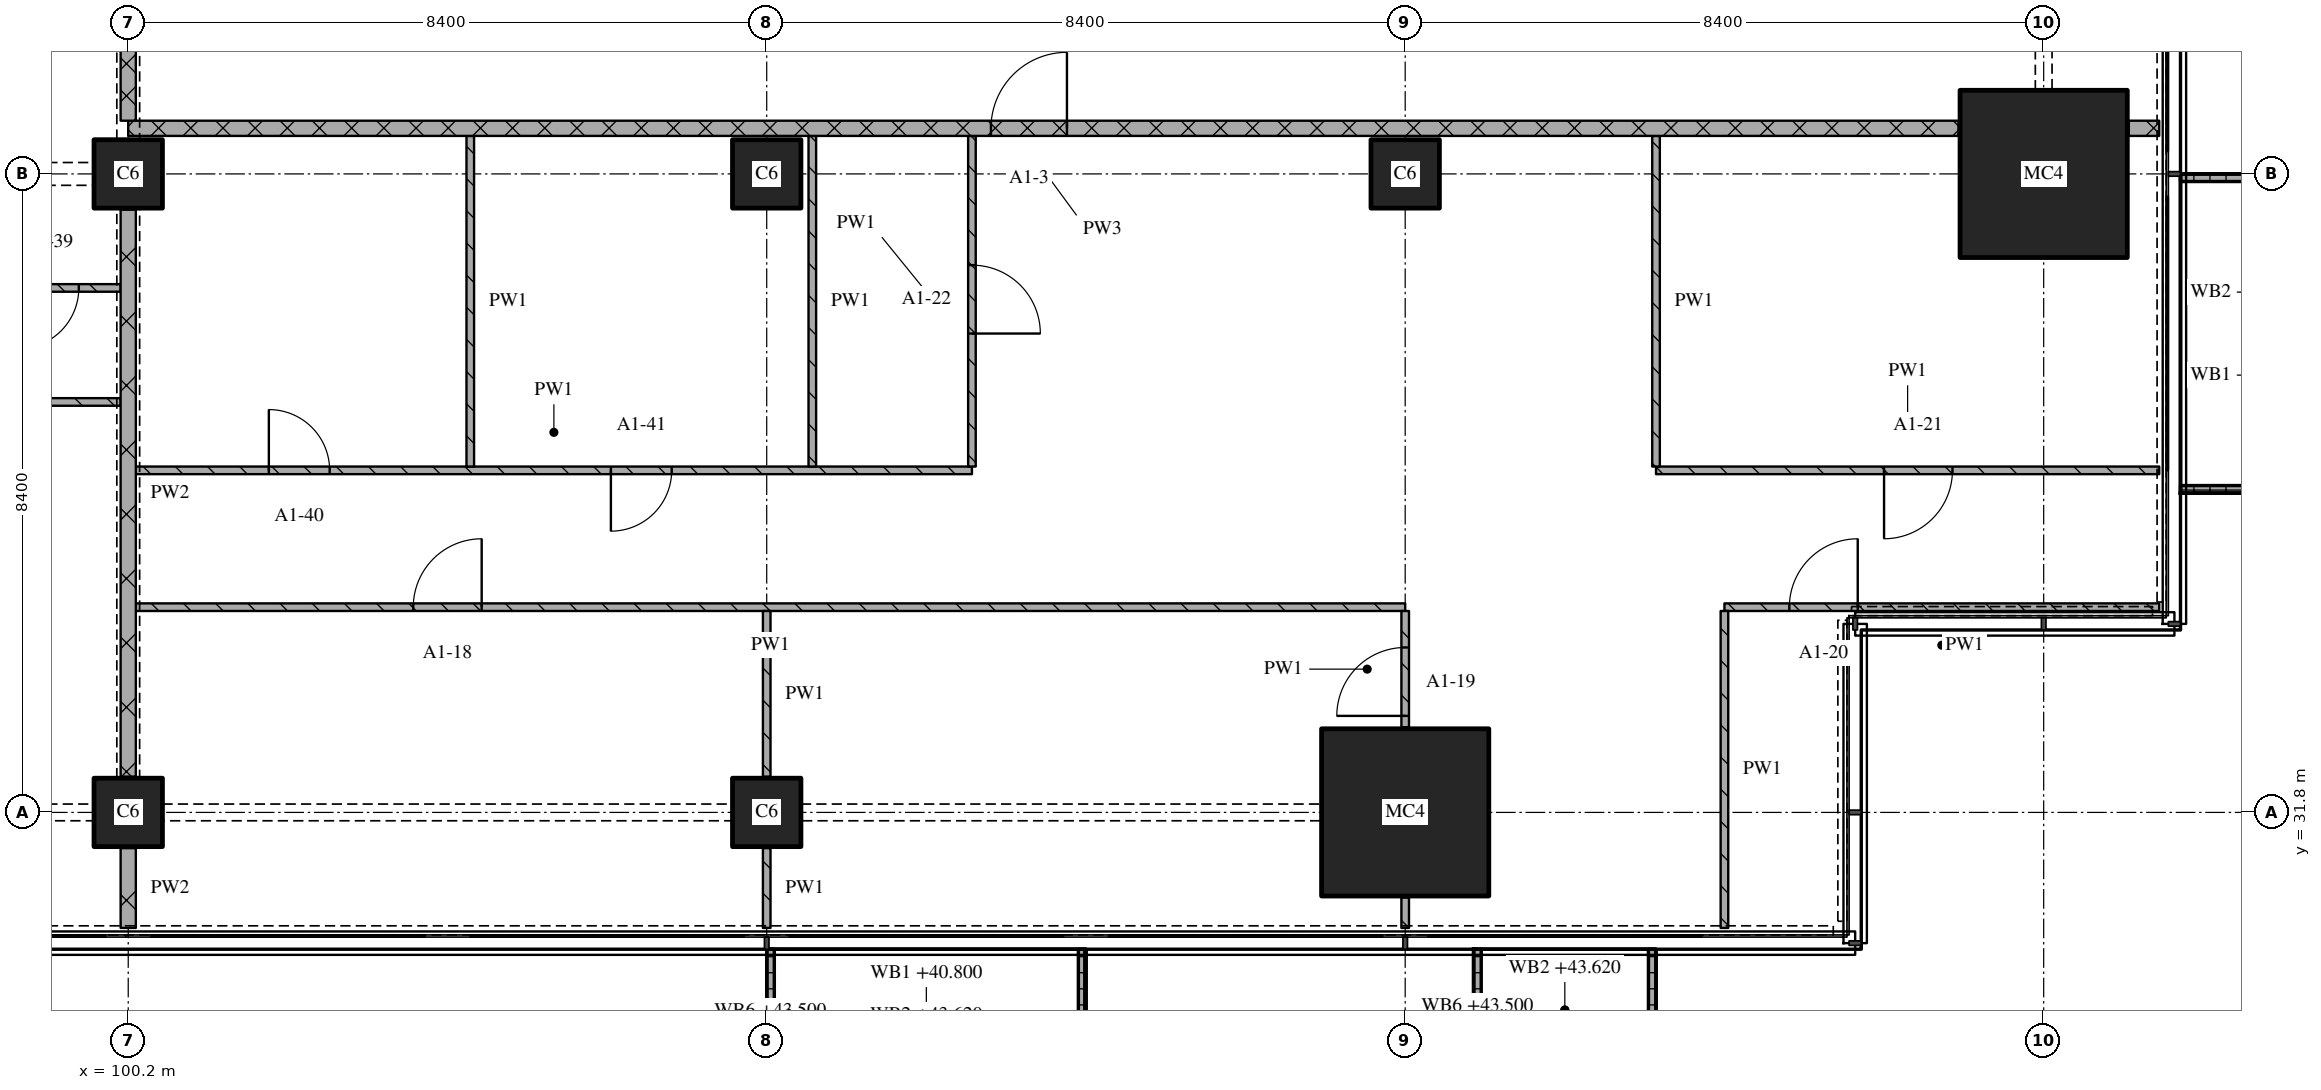
"""IFC4 building model, lengths in metres.
Left out: names, types, materials, properties, quantities, classifications, styles, units other than length and angle.
Written with IfcOpenShell. Run it as: python <this file> out.ifc"""

import sys

from ifc_helpers import new_model, si_unit, direction, frame, frame_2d, origin, origin_2d, place, context, subcontext, project, spatial, polyline, rectangle, outline, extrude, element, fill, save


model = new_model("IFC4")
c1 = context("Model", 3, precision=1e-05, world=origin(), true_north=direction((0.0, 1.0)))
c2 = subcontext(c1, "Body", "Model", "MODEL_VIEW")
j1 = project(units=[si_unit("LENGTHUNIT", "METRE"), si_unit("PLANEANGLEUNIT", "RADIAN")], contexts=[c1])
p1 = place(None, origin())
s1 = spatial("IfcSite", under=j1, at=p1, CompositionType="ELEMENT")
p2 = place(p1, origin())
s2 = spatial("IfcBuilding", under=s1, at=p2, CompositionType="ELEMENT")
p3 = place(p2, frame((0.0, 0.0, 40.8)))
s3 = spatial("IfcBuildingStorey", under=s2, at=p3, CompositionType="ELEMENT", Elevation=40.8)
for number, where, z_axis, x_axis in (
    (1, (100.2, 31.8, 0.0), (0.0, 0.0, 1.0), (1.0, 0.0, 0.0)),
    (2, (100.2, 40.2, 0.0), (0.0, 0.0, 1.0), (1.0, 0.0, 0.0)),
    (3, (108.6, 31.8, 0.0), (0.0, 0.0, 1.0), (1.0, 0.0, 0.0)),
    (4, (108.6, 40.2, 0.0), (0.0, 0.0, 1.0), (1.0, 0.0, 0.0)),
):
    element("IfcColumn", number, at=place(p3, frame(where, z_axis=z_axis, x_axis=x_axis)), inside=s3, PredefinedType="COLUMN", context=c2, shape_type="SweptSolid", body=[
        extrude(rectangle(XDim=0.9, YDim=0.9, at=origin_2d()), origin(), (0.0, 0.0, 1.0), 3.6),
    ])
p4 = place(p3, frame((117.0, 31.8, 0.0), z_axis=(0.0, 0.0, 1.0), x_axis=(1.0, 0.0, 0.0)))
e5 = element("IfcColumn", 5, at=p4, inside=s3, PredefinedType="COLUMN", context=c2, shape_type="SweptSolid", body=[
    extrude(rectangle(XDim=2.2, YDim=2.2, at=origin_2d()), origin(), (0.0, 0.0, 1.0), 3.6),
])
p5 = place(p3, frame((117.0, 40.2, 0.0), z_axis=(0.0, 0.0, 1.0), x_axis=(1.0, 0.0, 0.0)))
e6 = element("IfcColumn", 6, at=p5, inside=s3, PredefinedType="COLUMN", context=c2, shape_type="SweptSolid", body=[
    extrude(rectangle(XDim=0.9, YDim=0.9, at=origin_2d()), origin(), (0.0, 0.0, 1.0), 3.6),
])
p6 = place(p3, frame((125.4, 40.2, 0.0), z_axis=(0.0, 0.0, 1.0), x_axis=(1.0, 0.0, 0.0)))
e7 = element("IfcColumn", 7, at=p6, inside=s3, PredefinedType="COLUMN", context=c2, shape_type="SweptSolid", body=[
    extrude(rectangle(XDim=2.2, YDim=2.2, at=origin_2d()), origin(), (0.0, 0.0, 1.0), 3.6),
])
p7 = place(p3, origin())
e8 = element("IfcWall", 8, at=p7, inside=s3, PredefinedType="SOLIDWALL", context=c2, shape_type="SweptSolid", body=[
    extrude(outline(polyline([(108.6, 30.0), (108.7, 30.0), (108.7, 28.367), (112.7, 28.367), (112.7, 30.0), (112.8, 30.0), (112.8, 28.267), (108.6, 28.267), (108.6, 30.0)])), origin(), (0.0, 0.0, 1.0), 1.0),
])
p8 = place(p3, origin())
e9 = element("IfcWall", 9, at=p8, inside=s3, PredefinedType="SOLIDWALL", context=c2, shape_type="SweptSolid", body=[
    extrude(outline(polyline([(117.9, 30.0), (118.0, 30.0), (118.0, 28.5), (120.2, 28.5), (120.2, 30.0), (120.3, 30.0), (120.3, 28.4), (117.9, 28.4), (117.9, 30.0)])), origin(), (0.0, 0.0, 1.0), 1.0),
])
p9 = place(p3, origin())
e10 = element("IfcWall", 10, at=p9, inside=s3, PredefinedType="SOLIDWALL", context=c2, shape_type="SweptSolid", body=[
    extrude(outline(polyline([(127.2, 36.0), (127.2, 36.1), (128.833, 36.1), (128.833, 40.1), (127.2, 40.1), (127.2, 40.2), (128.933, 40.2), (128.933, 36.0), (127.2, 36.0)])), origin(), (0.0, 0.0, 1.0), 1.0),
])
p10 = place(p3, frame((117.0, 34.5, 0.0), z_axis=(0.0, 0.0, 1.0), x_axis=(-1.0, 0.0, 0.0)))
e11 = element("IfcWall", 11, at=p10, inside=s3, PredefinedType="PARTITIONING", context=c2, shape_type="SweptSolid", body=[
    extrude(rectangle(XDim=16.7, YDim=0.1, at=frame_2d((8.35, 0.0))), origin(), (0.0, 0.0, 1.0), 3.32),
])
p11 = place(p10, frame((12.15, 0.0, 0.0)))
e12 = element("IfcOpeningElement", 12, at=p11, cuts=e11, PredefinedType="OPENING", context=c2, shape_type="SweptSolid", body=[
    extrude(rectangle(XDim=0.9, YDim=2.1, at=frame_2d((0.45, 1.05))), frame((0.0, 0.06, 0.0), z_axis=(0.0, -1.0, 0.0), x_axis=(1.0, 0.0, 0.0)), (0.0, 0.0, 1.0), 0.12),
])
p12 = place(p3, frame((126.92, 34.5, 0.0), z_axis=(0.0, 0.0, 1.0), x_axis=(-1.0, 0.0, 0.0)))
e13 = element("IfcWall", 13, at=p12, inside=s3, PredefinedType="PARTITIONING", context=c2, shape_type="SweptSolid", body=[
    extrude(rectangle(XDim=5.72, YDim=0.1, at=frame_2d((2.86, 0.0))), origin(), (0.0, 0.0, 1.0), 3.32),
])
p13 = place(p12, frame((3.966, 0.0, 0.0)))
e14 = element("IfcOpeningElement", 14, at=p13, cuts=e13, PredefinedType="OPENING", context=c2, shape_type="SweptSolid", body=[
    extrude(rectangle(XDim=0.9, YDim=2.1, at=frame_2d((0.45, 1.05))), frame((0.0, 0.06, 0.0), z_axis=(0.0, -1.0, 0.0), x_axis=(1.0, 0.0, 0.0)), (0.0, 0.0, 1.0), 0.12),
])
p14 = place(p3, frame((100.3, 36.3, 0.0), z_axis=(0.0, 0.0, 1.0), x_axis=(1.0, 0.0, 0.0)))
e15 = element("IfcWall", 15, at=p14, inside=s3, PredefinedType="PARTITIONING", context=c2, shape_type="SweptSolid", body=[
    extrude(rectangle(XDim=11.0, YDim=0.1, at=frame_2d((5.5, 0.0))), origin(), (0.0, 0.0, 1.0), 3.32),
])
p15 = place(p14, frame((1.75, 0.0, 0.0)))
e16 = element("IfcOpeningElement", 16, at=p15, cuts=e15, PredefinedType="OPENING", context=c2, shape_type="SweptSolid", body=[
    extrude(rectangle(XDim=0.8, YDim=2.1, at=frame_2d((0.4, 1.05))), frame((0.0, 0.06, 0.0), z_axis=(0.0, -1.0, 0.0), x_axis=(1.0, 0.0, 0.0)), (0.0, 0.0, 1.0), 0.12),
])
p16 = place(p14, frame((6.25, 0.0, 0.0)))
e17 = element("IfcOpeningElement", 17, at=p16, cuts=e15, PredefinedType="OPENING", context=c2, shape_type="SweptSolid", body=[
    extrude(rectangle(XDim=0.8, YDim=2.1, at=frame_2d((0.4, 1.05))), frame((0.0, 0.06, 0.0), z_axis=(0.0, -1.0, 0.0), x_axis=(1.0, 0.0, 0.0)), (0.0, 0.0, 1.0), 0.12),
])
p17 = place(p3, frame((120.3, 36.3, 0.0), z_axis=(0.0, 0.0, 1.0), x_axis=(1.0, 0.0, 0.0)))
e18 = element("IfcWall", 18, at=p17, inside=s3, PredefinedType="PARTITIONING", context=c2, shape_type="SweptSolid", body=[
    extrude(rectangle(XDim=6.62, YDim=0.1, at=frame_2d((3.31, 0.0))), origin(), (0.0, 0.0, 1.0), 3.32),
])
p18 = place(p17, frame((3.0, 0.0, 0.0)))
e19 = element("IfcOpeningElement", 19, at=p18, cuts=e18, PredefinedType="OPENING", context=c2, shape_type="SweptSolid", body=[
    extrude(rectangle(XDim=0.9, YDim=2.1, at=frame_2d((0.45, 1.05))), frame((0.0, 0.06, 0.0), z_axis=(0.0, -1.0, 0.0), x_axis=(1.0, 0.0, 0.0)), (0.0, 0.0, 1.0), 0.12),
])
p19 = place(p3, frame((100.1, 37.2, 0.0), z_axis=(0.0, 0.0, 1.0), x_axis=(-1.0, 0.0, 0.0)))
e20 = element("IfcWall", 20, at=p19, inside=s3, PredefinedType="PARTITIONING", context=c2, shape_type="SweptSolid", body=[
    extrude(rectangle(XDim=8.3, YDim=0.1, at=frame_2d((4.15, 0.0))), origin(), (0.0, 0.0, 1.0), 3.32),
])
p20 = place(p19, frame((3.65, 0.0, 0.0)))
e21 = element("IfcOpeningElement", 21, at=p20, cuts=e20, PredefinedType="OPENING", context=c2, shape_type="SweptSolid", body=[
    extrude(rectangle(XDim=0.9, YDim=2.1, at=frame_2d((0.45, 1.05))), frame((0.0, 0.06, 0.0), z_axis=(0.0, -1.0, 0.0), x_axis=(1.0, 0.0, 0.0)), (0.0, 0.0, 1.0), 0.12),
])
p21 = place(p3, frame((93.9, 38.7, 0.0), z_axis=(0.0, 0.0, 1.0), x_axis=(1.0, 0.0, 0.0)))
e22 = element("IfcWall", 22, at=p21, inside=s3, PredefinedType="PARTITIONING", context=c2, shape_type="SweptSolid", body=[
    extrude(rectangle(XDim=6.2, YDim=0.1, at=frame_2d((3.1, 0.0))), origin(), (0.0, 0.0, 1.0), 3.32),
])
p22 = place(p21, frame((4.85, 0.0, 0.0)))
e23 = element("IfcOpeningElement", 23, at=p22, cuts=e22, PredefinedType="OPENING", context=c2, shape_type="SweptSolid", body=[
    extrude(rectangle(XDim=0.8, YDim=2.1, at=frame_2d((0.4, 1.05))), frame((0.0, 0.06, 0.0), z_axis=(0.0, -1.0, 0.0), x_axis=(1.0, 0.0, 0.0)), (0.0, 0.0, 1.0), 0.12),
])
p23 = place(p3, frame((124.28, 40.8, 0.0), z_axis=(0.0, 0.0, 1.0), x_axis=(-1.0, 0.0, 0.0)))
e24 = element("IfcWall", 24, at=p23, inside=s3, PredefinedType="PARTITIONING", context=c2, shape_type="SweptSolid", body=[
    extrude(rectangle(XDim=24.08, YDim=0.2, at=frame_2d((12.04, 0.0))), origin(), (0.0, 0.0, 1.0), 3.32),
])
p24 = place(p23, frame((11.73, 0.0, 0.0)))
e25 = element("IfcOpeningElement", 25, at=p24, cuts=e24, PredefinedType="OPENING", context=c2, shape_type="SweptSolid", body=[
    extrude(rectangle(XDim=1.0, YDim=2.1, at=frame_2d((0.5, 1.05))), frame((0.0, 0.11, 0.0), z_axis=(0.0, -1.0, 0.0), x_axis=(1.0, 0.0, 0.0)), (0.0, 0.0, 1.0), 0.22),
])
p25 = place(p3, frame((126.52, 40.8, 0.0), z_axis=(0.0, 0.0, 1.0), x_axis=(1.0, 0.0, 0.0)))
e26 = element("IfcWall", 26, at=p25, inside=s3, PredefinedType="PARTITIONING", context=c2, shape_type="SweptSolid", body=[
    extrude(rectangle(XDim=0.4, YDim=0.2, at=frame_2d((0.2, 0.0))), origin(), (0.0, 0.0, 1.0), 3.32),
])
p26 = place(p3, frame((100.2, 43.1, 0.0), z_axis=(0.0, 0.0, 1.0), x_axis=(0.0, -1.0, 0.0)))
e27 = element("IfcWall", 27, at=p26, inside=s3, PredefinedType="PARTITIONING", context=c2, shape_type="SweptSolid", body=[
    extrude(rectangle(XDim=2.2, YDim=0.2, at=frame_2d((1.1, 0.0))), origin(), (0.0, 0.0, 1.0), 2.43),
])
p27 = place(p3, frame((100.2, 31.33, 0.0), z_axis=(0.0, 0.0, 1.0), x_axis=(0.0, -1.0, 0.0)))
e28 = element("IfcWall", 28, at=p27, inside=s3, PredefinedType="PARTITIONING", context=c2, shape_type="SweptSolid", body=[
    extrude(rectangle(XDim=1.05, YDim=0.2, at=frame_2d((0.525, 0.0))), origin(), (0.0, 0.0, 1.0), 3.32),
])
p28 = place(p3, frame((100.2, 39.73, 0.0), z_axis=(0.0, 0.0, 1.0), x_axis=(0.0, -1.0, 0.0)))
e29 = element("IfcWall", 29, at=p28, inside=s3, PredefinedType="PARTITIONING", context=c2, shape_type="SweptSolid", body=[
    extrude(rectangle(XDim=7.46, YDim=0.2, at=frame_2d((3.73, 0.0))), origin(), (0.0, 0.0, 1.0), 2.83),
])
p29 = place(p3, frame((104.7, 40.7, 0.0), z_axis=(0.0, 0.0, 1.0), x_axis=(0.0, -1.0, 0.0)))
e30 = element("IfcWall", 30, at=p29, inside=s3, PredefinedType="PARTITIONING", context=c2, shape_type="SweptSolid", body=[
    extrude(rectangle(XDim=4.35, YDim=0.1, at=frame_2d((2.175, 0.0))), origin(), (0.0, 0.0, 1.0), 3.32),
])
p30 = place(p3, frame((108.6, 31.33, 0.0), z_axis=(0.0, 0.0, 1.0), x_axis=(0.0, -1.0, 0.0)))
e31 = element("IfcWall", 31, at=p30, inside=s3, PredefinedType="PARTITIONING", context=c2, shape_type="SweptSolid", body=[
    extrude(rectangle(XDim=1.05, YDim=0.1, at=frame_2d((0.525, 0.0))), origin(), (0.0, 0.0, 1.0), 3.32),
])
p31 = place(p3, frame((108.6, 34.45, 0.0), z_axis=(0.0, 0.0, 1.0), x_axis=(0.0, -1.0, 0.0)))
e32 = element("IfcWall", 32, at=p31, inside=s3, PredefinedType="PARTITIONING", context=c2, shape_type="SweptSolid", body=[
    extrude(rectangle(XDim=2.18, YDim=0.1, at=frame_2d((1.09, 0.0))), origin(), (0.0, 0.0, 1.0), 3.32),
])
p32 = place(p3, frame((109.2, 40.7, 0.0), z_axis=(0.0, 0.0, 1.0), x_axis=(0.0, -1.0, 0.0)))
e33 = element("IfcWall", 33, at=p32, inside=s3, PredefinedType="PARTITIONING", context=c2, shape_type="SweptSolid", body=[
    extrude(rectangle(XDim=4.35, YDim=0.1, at=frame_2d((2.175, 0.0))), origin(), (0.0, 0.0, 1.0), 3.32),
])
p33 = place(p3, frame((111.3, 36.35, 0.0), z_axis=(0.0, 0.0, 1.0), x_axis=(0.0, 1.0, 0.0)))
e34 = element("IfcWall", 34, at=p33, inside=s3, PredefinedType="PARTITIONING", context=c2, shape_type="SweptSolid", body=[
    extrude(rectangle(XDim=4.35, YDim=0.1, at=frame_2d((2.175, 0.0))), origin(), (0.0, 0.0, 1.0), 3.32),
])
p34 = place(p33, frame((1.75, 0.0, 0.0)))
e35 = element("IfcOpeningElement", 35, at=p34, cuts=e34, PredefinedType="OPENING", context=c2, shape_type="SweptSolid", body=[
    extrude(rectangle(XDim=0.9, YDim=2.1, at=frame_2d((0.45, 1.05))), frame((0.0, 0.06, 0.0), z_axis=(0.0, -1.0, 0.0), x_axis=(1.0, 0.0, 0.0)), (0.0, 0.0, 1.0), 0.12),
])
p35 = place(p3, frame((117.0, 30.68, 0.0), z_axis=(0.0, 0.0, 1.0), x_axis=(0.0, -1.0, 0.0)))
e36 = element("IfcWall", 36, at=p35, inside=s3, PredefinedType="PARTITIONING", context=c2, shape_type="SweptSolid", body=[
    extrude(rectangle(XDim=0.4, YDim=0.1, at=frame_2d((0.2, 0.0))), origin(), (0.0, 0.0, 1.0), 3.32),
])
p36 = place(p3, frame((117.0, 32.92, 0.0), z_axis=(0.0, 0.0, 1.0), x_axis=(0.0, 1.0, 0.0)))
e37 = element("IfcWall", 37, at=p36, inside=s3, PredefinedType="PARTITIONING", context=c2, shape_type="SweptSolid", body=[
    extrude(rectangle(XDim=1.53, YDim=0.1, at=frame_2d((0.765, 0.0))), origin(), (0.0, 0.0, 1.0), 3.32),
])
p37 = place(p36, frame((0.15, 0.0, 0.0)))
e38 = element("IfcOpeningElement", 38, at=p37, cuts=e37, PredefinedType="OPENING", context=c2, shape_type="SweptSolid", body=[
    extrude(rectangle(XDim=0.9, YDim=2.1, at=frame_2d((0.45, 1.05))), frame((0.0, 0.06, 0.0), z_axis=(0.0, -1.0, 0.0), x_axis=(1.0, 0.0, 0.0)), (0.0, 0.0, 1.0), 0.12),
])
p38 = place(p3, frame((120.3, 40.7, 0.0), z_axis=(0.0, 0.0, 1.0), x_axis=(0.0, -1.0, 0.0)))
e39 = element("IfcWall", 39, at=p38, inside=s3, PredefinedType="PARTITIONING", context=c2, shape_type="SweptSolid", body=[
    extrude(rectangle(XDim=4.35, YDim=0.1, at=frame_2d((2.175, 0.0))), origin(), (0.0, 0.0, 1.0), 3.32),
])
p39 = place(p3, frame((121.2, 34.45, 0.0), z_axis=(0.0, 0.0, 1.0), x_axis=(0.0, -1.0, 0.0)))
e40 = element("IfcWall", 40, at=p39, inside=s3, PredefinedType="PARTITIONING", context=c2, shape_type="SweptSolid", body=[
    extrude(rectangle(XDim=4.17, YDim=0.1, at=frame_2d((2.085, 0.0))), origin(), (0.0, 0.0, 1.0), 3.32),
])
p40 = place(p11, origin())
e41 = element("IfcDoor", 41, at=p40, inside=s3, OperationType="SINGLE_SWING_RIGHT", PredefinedType="DOOR", context=c2, shape_type="SweptSolid", body=[
    extrude(rectangle(XDim=0.9, YDim=2.1, at=frame_2d((0.45, 1.05))), frame((0.0, 0.025, 0.0), z_axis=(0.0, -1.0, 0.0), x_axis=(1.0, 0.0, 0.0)), (0.0, 0.0, 1.0), 0.05),
])
fill(e12, e41)
p41 = place(p13, origin())
e42 = element("IfcDoor", 42, at=p41, inside=s3, OperationType="SINGLE_SWING_RIGHT", PredefinedType="DOOR", context=c2, shape_type="SweptSolid", body=[
    extrude(rectangle(XDim=0.9, YDim=2.1, at=frame_2d((0.45, 1.05))), frame((0.0, 0.025, 0.0), z_axis=(0.0, -1.0, 0.0), x_axis=(1.0, 0.0, 0.0)), (0.0, 0.0, 1.0), 0.05),
])
fill(e14, e42)
p42 = place(p15, origin())
e43 = element("IfcDoor", 43, at=p42, inside=s3, OperationType="SINGLE_SWING_LEFT", PredefinedType="DOOR", context=c2, shape_type="SweptSolid", body=[
    extrude(rectangle(XDim=0.8, YDim=2.1, at=frame_2d((0.4, 1.05))), frame((0.0, 0.025, 0.0), z_axis=(0.0, -1.0, 0.0), x_axis=(1.0, 0.0, 0.0)), (0.0, 0.0, 1.0), 0.05),
])
fill(e16, e43)
p43 = place(p16, origin())
e44 = element("IfcDoor", 44, at=p43, inside=s3, OperationType="SINGLE_SWING_RIGHT", PredefinedType="DOOR", context=c2, shape_type="SweptSolid", body=[
    extrude(rectangle(XDim=0.8, YDim=2.1, at=frame_2d((0.4, 1.05))), frame((0.0, 0.025, 0.0), z_axis=(0.0, -1.0, 0.0), x_axis=(1.0, 0.0, 0.0)), (0.0, 0.0, 1.0), 0.05),
])
fill(e17, e44)
p44 = place(p18, origin())
e45 = element("IfcDoor", 45, at=p44, inside=s3, OperationType="SINGLE_SWING_RIGHT", PredefinedType="DOOR", context=c2, shape_type="SweptSolid", body=[
    extrude(rectangle(XDim=0.9, YDim=2.1, at=frame_2d((0.45, 1.05))), frame((0.0, 0.025, 0.0), z_axis=(0.0, -1.0, 0.0), x_axis=(1.0, 0.0, 0.0)), (0.0, 0.0, 1.0), 0.05),
])
fill(e19, e45)
p45 = place(p22, origin())
e46 = element("IfcDoor", 46, at=p45, inside=s3, OperationType="SINGLE_SWING_RIGHT", PredefinedType="DOOR", context=c2, shape_type="SweptSolid", body=[
    extrude(rectangle(XDim=0.8, YDim=2.1, at=frame_2d((0.4, 1.05))), frame((0.0, 0.025, 0.0), z_axis=(0.0, -1.0, 0.0), x_axis=(1.0, 0.0, 0.0)), (0.0, 0.0, 1.0), 0.05),
])
fill(e23, e46)
p46 = place(p24, origin())
e47 = element("IfcDoor", 47, at=p46, inside=s3, OperationType="SINGLE_SWING_RIGHT", PredefinedType="DOOR", context=c2, shape_type="SweptSolid", body=[
    extrude(rectangle(XDim=1.0, YDim=2.1, at=frame_2d((0.5, 1.05))), frame((0.0, 0.025, 0.0), z_axis=(0.0, -1.0, 0.0), x_axis=(1.0, 0.0, 0.0)), (0.0, 0.0, 1.0), 0.05),
])
fill(e25, e47)
p47 = place(p34, origin())
e48 = element("IfcDoor", 48, at=p47, inside=s3, OperationType="SINGLE_SWING_RIGHT", PredefinedType="DOOR", context=c2, shape_type="SweptSolid", body=[
    extrude(rectangle(XDim=0.9, YDim=2.1, at=frame_2d((0.45, 1.05))), frame((0.0, 0.025, 0.0), z_axis=(0.0, -1.0, 0.0), x_axis=(1.0, 0.0, 0.0)), (0.0, 0.0, 1.0), 0.05),
])
fill(e35, e48)
p48 = place(p37, origin())
e49 = element("IfcDoor", 49, at=p48, inside=s3, OperationType="SINGLE_SWING_LEFT", PredefinedType="DOOR", context=c2, shape_type="SweptSolid", body=[
    extrude(rectangle(XDim=0.9, YDim=2.1, at=frame_2d((0.45, 1.05))), frame((0.0, 0.025, 0.0), z_axis=(0.0, -1.0, 0.0), x_axis=(1.0, 0.0, 0.0)), (0.0, 0.0, 1.0), 0.05),
])
fill(e38, e49)
save(model, sys.argv[1])
